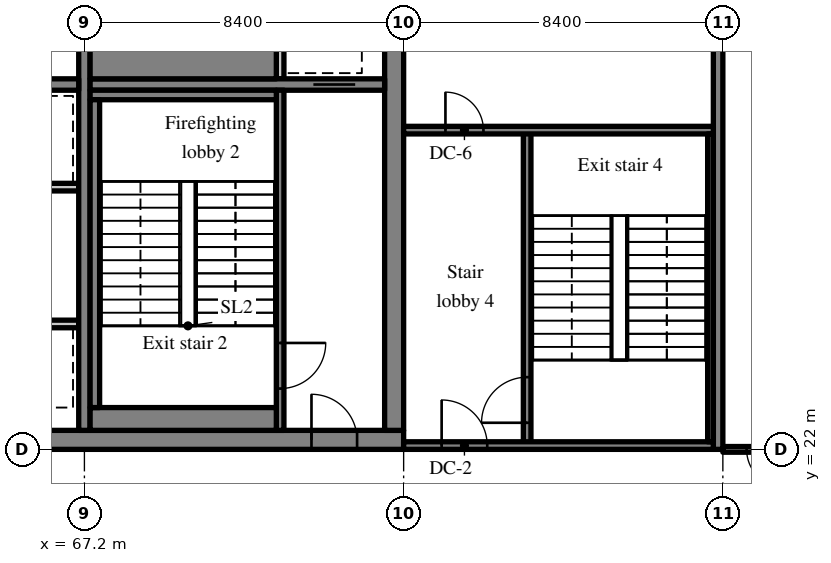
"""IFC4 building model, lengths in metres.
Left out: names, types, materials, properties, quantities, classifications, styles, units other than length and angle.
Written with IfcOpenShell. Run it as: python <this file> out.ifc"""

import sys

from ifc_helpers import new_model, si_unit, direction, frame, frame_2d, origin, place, context, subcontext, project, spatial, rectangle, extrude, source, transform, mapped, element, fill, save


model = new_model("IFC4")
c1 = context("Model", 3, precision=1e-05, world=origin(), true_north=direction((0.0, 1.0)))
c2 = subcontext(c1, "Body", "Model", "MODEL_VIEW")
j1 = project(units=[si_unit("LENGTHUNIT", "METRE"), si_unit("PLANEANGLEUNIT", "RADIAN")], contexts=[c1])
p1 = place(None, origin())
s1 = spatial("IfcSite", under=j1, at=p1, CompositionType="ELEMENT")
p2 = place(p1, origin())
s2 = spatial("IfcBuilding", under=s1, at=p2, CompositionType="ELEMENT")
p3 = place(p2, frame((0.0, 0.0, 281.7)))
s3 = spatial("IfcBuildingStorey", under=s2, at=p3, CompositionType="ELEMENT", Elevation=281.7)
m1 = source(origin(), c2, "Body", "SweptSolid", [
    extrude(rectangle(XDim=50.4, YDim=0.5, at=frame_2d((25.2, 0.0))), origin(), (0.0, 0.0, 1.0), 3.72),
])
p4 = place(p3, frame((25.2, 22.25, 0.0), z_axis=(0.0, 0.0, 1.0), x_axis=(1.0, 0.0, 0.0)))
e1 = element("IfcWall", 1, at=p4, inside=s3, PredefinedType="SHEAR", context=c2, shape_type="MappedRepresentation", body=[
    mapped(m1, transform((0.0, 0.0, 0.0), scale=1.0)),
])
m2 = source(origin(), c2, "Body", "SweptSolid", [
    extrude(rectangle(XDim=1.8, YDim=2.1, at=frame_2d((0.9, 1.05))), frame((0.0, 0.26, 0.0), z_axis=(0.0, -1.0, 0.0), x_axis=(1.0, 0.0, 0.0)), (0.0, 0.0, 1.0), 0.52),
])
p5 = place(p4, frame((15.9, 0.0, 0.0)))
e2 = element("IfcOpeningElement", 2, at=p5, cuts=e1, PredefinedType="OPENING", context=c2, shape_type="MappedRepresentation", body=[
    mapped(m2, transform((0.0, 0.0, 0.0), scale=1.0)),
])
m3 = source(origin(), c2, "Body", "SweptSolid", [
    extrude(rectangle(XDim=0.9, YDim=2.1, at=frame_2d((0.45, 1.05))), frame((0.0, 0.26, 0.0), z_axis=(0.0, -1.0, 0.0), x_axis=(1.0, 0.0, 0.0)), (0.0, 0.0, 1.0), 0.52),
])
p6 = place(p4, frame((21.525, 0.0, 0.0)))
e3 = element("IfcOpeningElement", 3, at=p6, cuts=e1, PredefinedType="OPENING", context=c2, shape_type="MappedRepresentation", body=[
    mapped(m3, transform((0.0, 0.0, 0.0), scale=1.0)),
])
p7 = place(p4, frame((32.7, 0.0, 0.0)))
e4 = element("IfcOpeningElement", 4, at=p7, cuts=e1, PredefinedType="OPENING", context=c2, shape_type="MappedRepresentation", body=[
    mapped(m2, transform((0.0, 0.0, 0.0), scale=1.0)),
])
m4 = source(origin(), c2, "Body", "SweptSolid", [
    extrude(rectangle(XDim=1.2, YDim=2.1, at=frame_2d((0.6, 1.05))), frame((0.0, 0.26, 0.0), z_axis=(0.0, -1.0, 0.0), x_axis=(1.0, 0.0, 0.0)), (0.0, 0.0, 1.0), 0.52),
])
p8 = place(p4, frame((6.5, 0.0, 0.0)))
e5 = element("IfcOpeningElement", 5, at=p8, cuts=e1, PredefinedType="OPENING", context=c2, shape_type="MappedRepresentation", body=[
    mapped(m4, transform((0.0, 0.0, 0.0), scale=1.0)),
])
p9 = place(p4, frame((47.975, 0.0, 0.0)))
e6 = element("IfcOpeningElement", 6, at=p9, cuts=e1, PredefinedType="OPENING", context=c2, shape_type="MappedRepresentation", body=[
    mapped(m4, transform((0.0, 0.0, 0.0), scale=1.0)),
])
m5 = source(origin(), c2, "Body", "SweptSolid", [
    extrude(rectangle(XDim=19.0, YDim=0.5, at=frame_2d((9.5, 0.0))), origin(), (0.0, 0.0, 1.0), 3.72),
])
p10 = place(p3, frame((75.35, 22.5, 0.0), z_axis=(0.0, 0.0, 1.0), x_axis=(0.0, 1.0, 0.0)))
e7 = element("IfcWall", 7, at=p10, inside=s3, PredefinedType="SHEAR", context=c2, shape_type="MappedRepresentation", body=[
    mapped(m5, transform((0.0, 0.0, 0.0), scale=1.0)),
])
p11 = place(p10, frame((12.9, 0.0, 0.0)))
e8 = element("IfcOpeningElement", 8, at=p11, cuts=e7, PredefinedType="OPENING", context=c2, shape_type="MappedRepresentation", body=[
    mapped(m4, transform((0.0, 0.0, 0.0), scale=1.0)),
])
m6 = source(origin(), c2, "Body", "SweptSolid", [
    extrude(rectangle(XDim=19.0, YDim=0.3, at=frame_2d((9.5, 0.0))), origin(), (0.0, 0.0, 1.0), 3.72),
])
p12 = place(p3, frame((67.2, 22.5, 0.0), z_axis=(0.0, 0.0, 1.0), x_axis=(0.0, 1.0, 0.0)))
e9 = element("IfcWall", 9, at=p12, inside=s3, PredefinedType="SHEAR", context=c2, shape_type="MappedRepresentation", body=[
    mapped(m6, transform((0.0, 0.0, 0.0), scale=1.0)),
])
m7 = source(origin(), c2, "Body", "SweptSolid", [
    extrude(rectangle(XDim=16.5, YDim=0.3, at=frame_2d((8.25, 0.0))), origin(), (0.0, 0.0, 1.0), 3.72),
])
p13 = place(p3, frame((50.55, 31.6, 0.0), z_axis=(0.0, 0.0, 1.0), x_axis=(1.0, 0.0, 0.0)))
e10 = element("IfcWall", 10, at=p13, inside=s3, PredefinedType="SHEAR", context=c2, shape_type="MappedRepresentation", body=[
    mapped(m7, transform((0.0, 0.0, 0.0), scale=1.0)),
])
m8 = source(origin(), c2, "Body", "SweptSolid", [
    extrude(rectangle(XDim=1.0, YDim=2.1, at=frame_2d((0.5, 1.05))), frame((0.0, 0.16, 0.0), z_axis=(0.0, -1.0, 0.0), x_axis=(1.0, 0.0, 0.0)), (0.0, 0.0, 1.0), 0.32),
])
p14 = place(p13, frame((0.625, 0.0, 0.0)))
e11 = element("IfcOpeningElement", 11, at=p14, cuts=e10, PredefinedType="OPENING", context=c2, shape_type="MappedRepresentation", body=[
    mapped(m8, transform((0.0, 0.0, 0.0), scale=1.0)),
])
m9 = source(origin(), c2, "Body", "SweptSolid", [
    extrude(rectangle(XDim=7.75, YDim=0.3, at=frame_2d((3.875, 0.0))), origin(), (0.0, 0.0, 1.0), 3.72),
])
p15 = place(p3, frame((67.35, 31.6, 0.0), z_axis=(0.0, 0.0, 1.0), x_axis=(1.0, 0.0, 0.0)))
e12 = element("IfcWall", 12, at=p15, inside=s3, PredefinedType="SHEAR", context=c2, shape_type="MappedRepresentation", body=[
    mapped(m9, transform((0.0, 0.0, 0.0), scale=1.0)),
])
m10 = source(origin(), c2, "Body", "SweptSolid", [
    extrude(rectangle(XDim=1.1, YDim=2.1, at=frame_2d((0.55, 1.05))), frame((0.0, 0.16, 0.0), z_axis=(0.0, -1.0, 0.0), x_axis=(1.0, 0.0, 0.0)), (0.0, 0.0, 1.0), 0.32),
])
p16 = place(p15, frame((5.875, 0.0, 0.0)))
e13 = element("IfcOpeningElement", 13, at=p16, cuts=e12, PredefinedType="OPENING", context=c2, shape_type="MappedRepresentation", body=[
    mapped(m10, transform((0.0, 0.0, 0.0), scale=1.0)),
])
m11 = source(origin(), c2, "Body", "SweptSolid", [
    extrude(rectangle(XDim=18.4, YDim=0.25, at=frame_2d((9.2, 0.0))), origin(), (0.0, 0.0, 1.0), 3.72),
])
p17 = place(p3, frame((83.875, 22.0, 0.0), z_axis=(0.0, 0.0, 1.0), x_axis=(0.0, 1.0, 0.0)))
e14 = element("IfcWall", 14, at=p17, inside=s3, PredefinedType="SHEAR", context=c2, shape_type="MappedRepresentation", body=[
    mapped(m11, transform((0.0, 0.0, 0.0), scale=1.0)),
])
m12 = source(origin(), c2, "Body", "SweptSolid", [
    extrude(rectangle(XDim=6.15, YDim=0.2, at=frame_2d((3.075, 0.0))), origin(), (0.0, 0.0, 1.0), 3.72),
])
p18 = place(p3, frame((67.05, 25.3, 0.0), z_axis=(0.0, 0.0, 1.0), x_axis=(-1.0, 0.0, 0.0)))
e15 = element("IfcWall", 15, at=p18, inside=s3, PredefinedType="SOLIDWALL", context=c2, shape_type="MappedRepresentation", body=[
    mapped(m12, transform((0.0, 0.0, 0.0), scale=1.0)),
])
m13 = source(origin(), c2, "Body", "SweptSolid", [
    extrude(rectangle(XDim=1.1, YDim=2.1, at=frame_2d((0.55, 1.05))), frame((0.0, 0.11, 0.0), z_axis=(0.0, -1.0, 0.0), x_axis=(1.0, 0.0, 0.0)), (0.0, 0.0, 1.0), 0.22),
])
p19 = place(p18, frame((1.1, 0.0, 0.0)))
e16 = element("IfcOpeningElement", 16, at=p19, cuts=e15, PredefinedType="OPENING", context=c2, shape_type="MappedRepresentation", body=[
    mapped(m13, transform((0.0, 0.0, 0.0), scale=1.0)),
])
p20 = place(p18, frame((4.1, 0.0, 0.0)))
e17 = element("IfcOpeningElement", 17, at=p20, cuts=e15, PredefinedType="OPENING", context=c2, shape_type="MappedRepresentation", body=[
    mapped(m13, transform((0.0, 0.0, 0.0), scale=1.0)),
])
m14 = source(origin(), c2, "Body", "SweptSolid", [
    extrude(rectangle(XDim=12.15, YDim=0.2, at=frame_2d((6.075, 0.0))), origin(), (0.0, 0.0, 1.0), 3.72),
])
p21 = place(p3, frame((67.05, 28.9, 0.0), z_axis=(0.0, 0.0, 1.0), x_axis=(-1.0, 0.0, 0.0)))
e18 = element("IfcWall", 18, at=p21, inside=s3, PredefinedType="SOLIDWALL", context=c2, shape_type="MappedRepresentation", body=[
    mapped(m14, transform((0.0, 0.0, 0.0), scale=1.0)),
])
p22 = place(p21, frame((1.1, 0.0, 0.0)))
e19 = element("IfcOpeningElement", 19, at=p22, cuts=e18, PredefinedType="OPENING", context=c2, shape_type="MappedRepresentation", body=[
    mapped(m13, transform((0.0, 0.0, 0.0), scale=1.0)),
])
p23 = place(p21, frame((4.1, 0.0, 0.0)))
e20 = element("IfcOpeningElement", 20, at=p23, cuts=e18, PredefinedType="OPENING", context=c2, shape_type="MappedRepresentation", body=[
    mapped(m13, transform((0.0, 0.0, 0.0), scale=1.0)),
])
m15 = source(origin(), c2, "Body", "SweptSolid", [
    extrude(rectangle(XDim=8.95, YDim=0.2, at=frame_2d((4.475, 0.0))), origin(), (0.0, 0.0, 1.0), 3.72),
])
p24 = place(p3, frame((72.35, 22.5, 0.0), z_axis=(0.0, 0.0, 1.0), x_axis=(0.0, 1.0, 0.0)))
e21 = element("IfcWall", 21, at=p24, inside=s3, PredefinedType="SOLIDWALL", context=c2, shape_type="MappedRepresentation", body=[
    mapped(m15, transform((0.0, 0.0, 0.0), scale=1.0)),
])
m16 = source(origin(), c2, "Body", "SweptSolid", [
    extrude(rectangle(XDim=1.2, YDim=2.1, at=frame_2d((0.6, 1.05))), frame((0.0, 0.11, 0.0), z_axis=(0.0, -1.0, 0.0), x_axis=(1.0, 0.0, 0.0)), (0.0, 0.0, 1.0), 0.22),
])
p25 = place(p24, frame((1.1, 0.0, 0.0)))
e22 = element("IfcOpeningElement", 22, at=p25, cuts=e21, PredefinedType="OPENING", context=c2, shape_type="MappedRepresentation", body=[
    mapped(m16, transform((0.0, 0.0, 0.0), scale=1.0)),
])
m17 = source(origin(), c2, "Body", "SweptSolid", [
    extrude(rectangle(XDim=1.85, YDim=0.2, at=frame_2d((0.925, 0.0))), origin(), (0.0, 0.0, 1.0), 3.72),
])
p26 = place(p3, frame((72.35, 31.75, 0.0), z_axis=(0.0, 0.0, 1.0), x_axis=(0.0, 1.0, 0.0)))
e23 = element("IfcWall", 23, at=p26, inside=s3, PredefinedType="SOLIDWALL", context=c2, shape_type="MappedRepresentation", body=[
    mapped(m17, transform((0.0, 0.0, 0.0), scale=1.0)),
])
m18 = source(origin(), c2, "Body", "SweptSolid", [
    extrude(rectangle(XDim=8.3, YDim=0.2, at=frame_2d((4.15, 0.0))), origin(), (0.0, 0.0, 1.0), 3.72),
])
p27 = place(p3, frame((78.85, 22.1, 0.0), z_axis=(0.0, 0.0, 1.0), x_axis=(0.0, 1.0, 0.0)))
e24 = element("IfcWall", 24, at=p27, inside=s3, PredefinedType="SOLIDWALL", context=c2, shape_type="MappedRepresentation", body=[
    mapped(m18, transform((0.0, 0.0, 0.0), scale=1.0)),
])
p28 = place(p27, frame((0.6, 0.0, 0.0)))
e25 = element("IfcOpeningElement", 25, at=p28, cuts=e24, PredefinedType="OPENING", context=c2, shape_type="MappedRepresentation", body=[
    mapped(m16, transform((0.0, 0.0, 0.0), scale=1.0)),
])
m19 = source(origin(), c2, "Body", "SweptSolid", [
    extrude(rectangle(XDim=8.15, YDim=0.2, at=frame_2d((4.075, 0.0))), origin(), (0.0, 0.0, 1.0), 3.72),
])
p29 = place(p3, frame((83.75, 22.1, 0.0), z_axis=(0.0, 0.0, 1.0), x_axis=(-1.0, 0.0, 0.0)))
e26 = element("IfcWall", 26, at=p29, inside=s3, PredefinedType="SOLIDWALL", context=c2, shape_type="MappedRepresentation", body=[
    mapped(m19, transform((0.0, 0.0, 0.0), scale=1.0)),
])
p30 = place(p29, frame((5.95, 0.0, 0.0)))
e27 = element("IfcOpeningElement", 27, at=p30, cuts=e26, PredefinedType="OPENING", context=c2, shape_type="MappedRepresentation", body=[
    mapped(m16, transform((0.0, 0.0, 0.0), scale=1.0)),
])
p31 = place(p3, frame((83.75, 30.4, 0.0), z_axis=(0.0, 0.0, 1.0), x_axis=(-1.0, 0.0, 0.0)))
e28 = element("IfcWall", 28, at=p31, inside=s3, PredefinedType="SOLIDWALL", context=c2, shape_type="MappedRepresentation", body=[
    mapped(m19, transform((0.0, 0.0, 0.0), scale=1.0)),
])
m20 = source(origin(), c2, "Body", "SweptSolid", [
    extrude(rectangle(XDim=1.0, YDim=2.1, at=frame_2d((0.5, 1.05))), frame((0.0, 0.11, 0.0), z_axis=(0.0, -1.0, 0.0), x_axis=(1.0, 0.0, 0.0)), (0.0, 0.0, 1.0), 0.22),
])
p32 = place(p31, frame((6.05, 0.0, 0.0)))
e29 = element("IfcOpeningElement", 29, at=p32, cuts=e28, PredefinedType="OPENING", context=c2, shape_type="MappedRepresentation", body=[
    mapped(m20, transform((0.0, 0.0, 0.0), scale=1.0)),
])
m21 = source(origin(), c2, "Body", "SweptSolid", [
    extrude(rectangle(XDim=4.9, YDim=0.6, at=frame_2d((2.45, 0.0))), origin(), (0.0, 0.0, 1.0), 3.72),
])
p33 = place(p3, frame((67.35, 22.8, 0.0), z_axis=(0.0, 0.0, 1.0), x_axis=(1.0, 0.0, 0.0)))
e30 = element("IfcWall", 30, at=p33, inside=s3, PredefinedType="SOLIDWALL", context=c2, shape_type="MappedRepresentation", body=[
    mapped(m21, transform((0.0, 0.0, 0.0), scale=1.0)),
])
m22 = source(origin(), c2, "Body", "SweptSolid", [
    extrude(rectangle(XDim=4.9, YDim=0.25, at=frame_2d((2.45, 0.0))), origin(), (0.0, 0.0, 1.0), 3.72),
])
p34 = place(p3, frame((67.35, 31.325, 0.0), z_axis=(0.0, 0.0, 1.0), x_axis=(1.0, 0.0, 0.0)))
e31 = element("IfcWall", 31, at=p34, inside=s3, PredefinedType="SOLIDWALL", context=c2, shape_type="MappedRepresentation", body=[
    mapped(m22, transform((0.0, 0.0, 0.0), scale=1.0)),
])
m23 = source(origin(), c2, "Body", "SweptSolid", [
    extrude(rectangle(XDim=8.1, YDim=0.25, at=frame_2d((4.05, 0.0))), origin(), (0.0, 0.0, 1.0), 3.72),
])
p35 = place(p3, frame((67.475, 23.1, 0.0), z_axis=(0.0, 0.0, 1.0), x_axis=(0.0, 1.0, 0.0)))
e32 = element("IfcWall", 32, at=p35, inside=s3, PredefinedType="SOLIDWALL", context=c2, shape_type="MappedRepresentation", body=[
    mapped(m23, transform((0.0, 0.0, 0.0), scale=1.0)),
])
m24 = source(origin(), c2, "Body", "SweptSolid", [
    extrude(rectangle(XDim=4.9, YDim=1.05, at=frame_2d((2.45, 0.0))), origin(), (0.0, 0.0, 1.0), 3.72),
])
p36 = place(p3, frame((67.35, 32.275, 0.0), z_axis=(0.0, 0.0, 1.0), x_axis=(1.0, 0.0, 0.0)))
e33 = element("IfcWall", 33, at=p36, inside=s3, PredefinedType="SOLIDWALL", context=c2, shape_type="MappedRepresentation", body=[
    mapped(m24, transform((0.0, 0.0, 0.0), scale=1.0)),
])
m25 = source(origin(), c2, "Body", "SweptSolid", [
    extrude(rectangle(XDim=8.1, YDim=0.15, at=frame_2d((4.05, 0.0))), origin(), (0.0, 0.0, 1.0), 3.72),
])
p37 = place(p3, frame((83.675, 22.2, 0.0), z_axis=(0.0, 0.0, 1.0), x_axis=(0.0, 1.0, 0.0)))
e34 = element("IfcWall", 34, at=p37, inside=s3, PredefinedType="SOLIDWALL", context=c2, shape_type="MappedRepresentation", body=[
    mapped(m25, transform((0.0, 0.0, 0.0), scale=1.0)),
])
m26 = source(origin(), c2, "Body", "SweptSolid", [
    extrude(rectangle(XDim=1.9, YDim=0.15, at=frame_2d((0.95, 0.0))), origin(), (0.0, 0.0, 1.0), 3.02),
])
p38 = place(p3, frame((84.0, 22.0, 0.0), z_axis=(0.0, 0.0, 1.0), x_axis=(1.0, 0.0, 0.0)))
e35 = element("IfcWall", 35, at=p38, inside=s3, PredefinedType="PARTITIONING", context=c2, shape_type="MappedRepresentation", body=[
    mapped(m26, transform((0.0, 0.0, 0.0), scale=1.0)),
])
m27 = source(origin(), c2, "Body", "SweptSolid", [
    extrude(rectangle(XDim=1.0, YDim=2.1, at=frame_2d((0.5, 1.05))), frame((0.0, 0.085, 0.0), z_axis=(0.0, -1.0, 0.0), x_axis=(1.0, 0.0, 0.0)), (0.0, 0.0, 1.0), 0.17),
])
p39 = place(p38, frame((0.625, 0.0, 0.0)))
e36 = element("IfcOpeningElement", 36, at=p39, cuts=e35, PredefinedType="OPENING", context=c2, shape_type="MappedRepresentation", body=[
    mapped(m27, transform((0.0, 0.0, 0.0), scale=1.0)),
])
m28 = source(origin(), c2, "Body", "SweptSolid", [
    extrude(rectangle(XDim=1.2, YDim=2.1, at=frame_2d((0.6, 1.05))), frame((0.0, 0.025, 0.0), z_axis=(0.0, -1.0, 0.0), x_axis=(1.0, 0.0, 0.0)), (0.0, 0.0, 1.0), 0.05),
])
p40 = place(p25, origin())
e37 = element("IfcDoor", 37, at=p40, inside=s3, OperationType="SINGLE_SWING_RIGHT", PredefinedType="DOOR", context=c2, shape_type="MappedRepresentation", body=[
    mapped(m28, transform((0.0, 0.0, 0.0), scale=1.0)),
])
fill(e22, e37)
m29 = source(origin(), c2, "Body", "SweptSolid", [
    extrude(rectangle(XDim=1.2, YDim=2.1, at=frame_2d((0.6, 1.05))), frame((0.0, 0.175, 0.0), z_axis=(0.0, -1.0, 0.0), x_axis=(1.0, 0.0, 0.0)), (0.0, 0.0, 1.0), 0.05),
])
p41 = place(p9, origin())
e38 = element("IfcDoor", 38, at=p41, inside=s3, OperationType="SINGLE_SWING_LEFT", PredefinedType="DOOR", context=c2, shape_type="MappedRepresentation", body=[
    mapped(m29, transform((0.0, 0.0, 0.0), scale=1.0)),
])
fill(e6, e38)
m30 = source(origin(), c2, "Body", "SweptSolid", [
    extrude(rectangle(XDim=1.1, YDim=2.1, at=frame_2d((0.55, 1.05))), frame((0.0, 0.025, 0.0), z_axis=(0.0, -1.0, 0.0), x_axis=(1.0, 0.0, 0.0)), (0.0, 0.0, 1.0), 0.05),
])
p42 = place(p16, origin())
e39 = element("IfcDoor", 39, at=p42, inside=s3, OperationType="SLIDING_TO_RIGHT", PredefinedType="DOOR", context=c2, shape_type="MappedRepresentation", body=[
    mapped(m30, transform((0.0, 0.0, 0.0), scale=1.0)),
])
fill(e13, e39)
p43 = place(p28, origin())
e40 = element("IfcDoor", 40, at=p43, inside=s3, OperationType="SINGLE_SWING_LEFT", PredefinedType="DOOR", context=c2, shape_type="MappedRepresentation", body=[
    mapped(m28, transform((0.0, 0.0, 0.0), scale=1.0)),
])
fill(e25, e40)
p44 = place(p30, origin())
e41 = element("IfcDoor", 41, at=p44, inside=s3, OperationType="SINGLE_SWING_RIGHT", PredefinedType="DOOR", context=c2, shape_type="MappedRepresentation", body=[
    mapped(m28, transform((0.0, 0.0, 0.0), scale=1.0)),
])
fill(e27, e41)
m31 = source(origin(), c2, "Body", "SweptSolid", [
    extrude(rectangle(XDim=1.0, YDim=2.1, at=frame_2d((0.5, 1.05))), frame((0.0, 0.025, 0.0), z_axis=(0.0, -1.0, 0.0), x_axis=(1.0, 0.0, 0.0)), (0.0, 0.0, 1.0), 0.05),
])
p45 = place(p32, origin())
e42 = element("IfcDoor", 42, at=p45, inside=s3, OperationType="SINGLE_SWING_RIGHT", PredefinedType="DOOR", context=c2, shape_type="MappedRepresentation", body=[
    mapped(m31, transform((0.0, 0.0, 0.0), scale=1.0)),
])
fill(e29, e42)
p46 = place(p39, origin())
e43 = element("IfcDoor", 43, at=p46, inside=s3, OperationType="SINGLE_SWING_RIGHT", PredefinedType="DOOR", context=c2, shape_type="MappedRepresentation", body=[
    mapped(m31, transform((0.0, 0.0, 0.0), scale=1.0)),
])
fill(e36, e43)
save(model, sys.argv[1])
